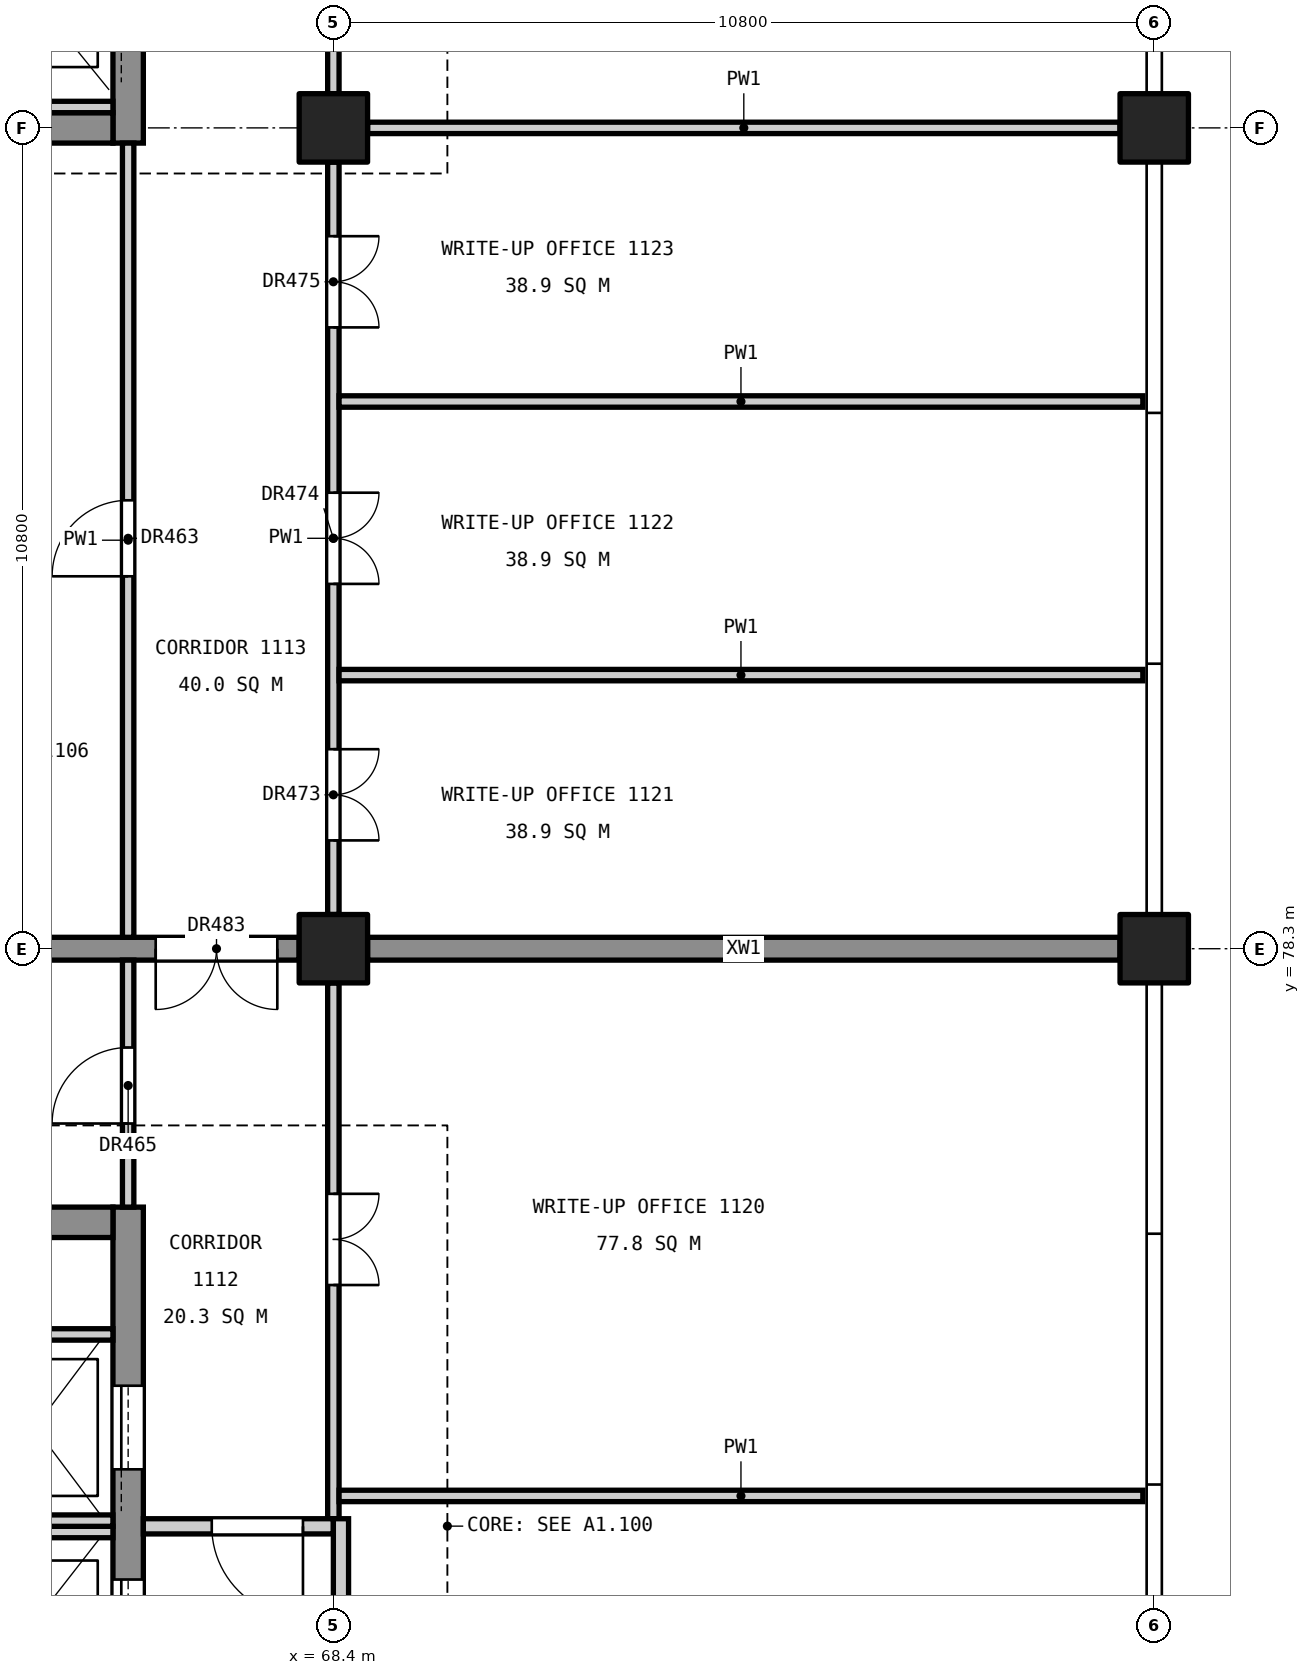
"""IFC4 building model, lengths in metres.
Left out: names, types, materials, properties, quantities, classifications, styles, units other than length and angle.
Written with IfcOpenShell. Run it as: python <this file> out.ifc"""

import sys

from ifc_helpers import new_model, si_unit, direction, frame, frame_2d, origin, origin_2d, place, context, subcontext, project, spatial, rectangle, extrude, element, fill, save


model = new_model("IFC4")
c1 = context("Model", 3, precision=1e-05, world=origin(), true_north=direction((0.0, 1.0)))
c2 = subcontext(c1, "Body", "Model", "MODEL_VIEW")
j1 = project(units=[si_unit("LENGTHUNIT", "METRE"), si_unit("PLANEANGLEUNIT", "RADIAN")], contexts=[c1])
p1 = place(None, origin())
s1 = spatial("IfcSite", under=j1, at=p1, CompositionType="ELEMENT")
p2 = place(p1, origin())
s2 = spatial("IfcBuilding", under=s1, at=p2, CompositionType="ELEMENT")
p3 = place(p2, frame((0.0, 0.0, 55.8)))
s3 = spatial("IfcBuildingStorey", under=s2, at=p3, CompositionType="ELEMENT", Elevation=55.8)
for number, where, z_axis, x_axis in (
    (1, (68.4, 78.3, 0.0), (0.0, 0.0, 1.0), (1.0, 0.0, 0.0)),
    (2, (68.4, 89.1, 0.0), (0.0, 0.0, 1.0), (1.0, 0.0, 0.0)),
    (3, (79.2, 78.3, 0.0), (0.0, 0.0, 1.0), (1.0, 0.0, 0.0)),
    (4, (79.2, 89.1, 0.0), (0.0, 0.0, 1.0), (1.0, 0.0, 0.0)),
):
    element("IfcColumn", number, at=place(p3, frame(where, z_axis=z_axis, x_axis=x_axis)), inside=s3, PredefinedType="COLUMN", context=c2, shape_type="SweptSolid", body=[
        extrude(rectangle(XDim=0.9, YDim=0.9, at=origin_2d()), origin(), (0.0, 0.0, 1.0), 4.8),
    ])
p4 = place(p3, frame((65.7, 60.1, 0.0), z_axis=(0.0, 0.0, 1.0), x_axis=(0.0, 1.0, 0.0)))
e5 = element("IfcWall", 5, at=p4, inside=s3, PredefinedType="SHEAR", context=c2, shape_type="SweptSolid", body=[
    extrude(rectangle(XDim=14.8, YDim=0.4, at=frame_2d((7.4, 0.0))), origin(), (0.0, 0.0, 1.0), 4.55),
])
p5 = place(p4, frame((0.5, 0.0, 0.0)))
e6 = element("IfcOpeningElement", 6, at=p5, cuts=e5, PredefinedType="OPENING", context=c2, shape_type="SweptSolid", body=[
    extrude(rectangle(XDim=1.4, YDim=2.1, at=frame_2d((0.7, 1.05))), frame((0.0, 0.21, 0.0), z_axis=(0.0, -1.0, 0.0), x_axis=(1.0, 0.0, 0.0)), (0.0, 0.0, 1.0), 0.42),
])
p6 = place(p4, frame((8.8, 0.0, 0.0)))
e7 = element("IfcOpeningElement", 7, at=p6, cuts=e5, PredefinedType="OPENING", context=c2, shape_type="SweptSolid", body=[
    extrude(rectangle(XDim=1.1, YDim=2.1, at=frame_2d((0.55, 1.05))), frame((0.0, 0.21, 0.0), z_axis=(0.0, -1.0, 0.0), x_axis=(1.0, 0.0, 0.0)), (0.0, 0.0, 1.0), 0.42),
])
p7 = place(p4, frame((11.35, 0.0, 0.0)))
e8 = element("IfcOpeningElement", 8, at=p7, cuts=e5, PredefinedType="OPENING", context=c2, shape_type="SweptSolid", body=[
    extrude(rectangle(XDim=1.1, YDim=2.1, at=frame_2d((0.55, 1.05))), frame((0.0, 0.21, 0.0), z_axis=(0.0, -1.0, 0.0), x_axis=(1.0, 0.0, 0.0)), (0.0, 0.0, 1.0), 0.42),
])
p8 = place(p3, frame((61.4, 74.7, 0.0), z_axis=(0.0, 0.0, 1.0), x_axis=(1.0, 0.0, 0.0)))
e9 = element("IfcWall", 9, at=p8, inside=s3, PredefinedType="SHEAR", context=c2, shape_type="SweptSolid", body=[
    extrude(rectangle(XDim=4.1, YDim=0.4, at=frame_2d((2.05, 0.0))), origin(), (0.0, 0.0, 1.0), 4.55),
])
p9 = place(p3, frame((65.7, 88.9, 0.0), z_axis=(0.0, 0.0, 1.0), x_axis=(0.0, 1.0, 0.0)))
e10 = element("IfcWall", 10, at=p9, inside=s3, PredefinedType="SHEAR", context=c2, shape_type="SweptSolid", body=[
    extrude(rectangle(XDim=11.2, YDim=0.4, at=frame_2d((5.6, 0.0))), origin(), (0.0, 0.0, 1.0), 4.55),
])
p10 = place(p9, frame((9.3, 0.0, 0.0)))
e11 = element("IfcOpeningElement", 11, at=p10, cuts=e10, PredefinedType="OPENING", context=c2, shape_type="SweptSolid", body=[
    extrude(rectangle(XDim=1.4, YDim=2.1, at=frame_2d((0.7, 1.05))), frame((0.0, 0.21, 0.0), z_axis=(0.0, -1.0, 0.0), x_axis=(1.0, 0.0, 0.0)), (0.0, 0.0, 1.0), 0.42),
])
p11 = place(p9, frame((1.35, 0.0, 0.0)))
e12 = element("IfcOpeningElement", 12, at=p11, cuts=e10, PredefinedType="OPENING", context=c2, shape_type="SweptSolid", body=[
    extrude(rectangle(XDim=1.1, YDim=2.1, at=frame_2d((0.55, 1.05))), frame((0.0, 0.21, 0.0), z_axis=(0.0, -1.0, 0.0), x_axis=(1.0, 0.0, 0.0)), (0.0, 0.0, 1.0), 0.42),
])
p12 = place(p3, frame((61.4, 89.1, 0.0), z_axis=(0.0, 0.0, 1.0), x_axis=(1.0, 0.0, 0.0)))
e13 = element("IfcWall", 13, at=p12, inside=s3, PredefinedType="SHEAR", context=c2, shape_type="SweptSolid", body=[
    extrude(rectangle(XDim=4.1, YDim=0.4, at=frame_2d((2.05, 0.0))), origin(), (0.0, 0.0, 1.0), 4.55),
])
p13 = place(p3, frame((61.65, 78.3, 0.0), z_axis=(0.0, 0.0, 1.0), x_axis=(1.0, 0.0, 0.0)))
e14 = element("IfcWall", 14, at=p13, inside=s3, PredefinedType="SHEAR", context=c2, shape_type="SweptSolid", body=[
    extrude(rectangle(XDim=6.3, YDim=0.3, at=frame_2d((3.15, 0.0))), origin(), (0.0, 0.0, 1.0), 4.55),
])
p14 = place(p13, frame((4.413, 0.0, 0.0)))
e15 = element("IfcOpeningElement", 15, at=p14, cuts=e14, PredefinedType="OPENING", context=c2, shape_type="SweptSolid", body=[
    extrude(rectangle(XDim=1.6, YDim=2.1, at=frame_2d((0.8, 1.05))), frame((0.0, 0.16, 0.0), z_axis=(0.0, -1.0, 0.0), x_axis=(1.0, 0.0, 0.0)), (0.0, 0.0, 1.0), 0.32),
])
p15 = place(p3, frame((68.85, 78.3, 0.0), z_axis=(0.0, 0.0, 1.0), x_axis=(1.0, 0.0, 0.0)))
e16 = element("IfcWall", 16, at=p15, inside=s3, PredefinedType="SHEAR", context=c2, shape_type="SweptSolid", body=[
    extrude(rectangle(XDim=9.9, YDim=0.3, at=frame_2d((4.95, 0.0))), origin(), (0.0, 0.0, 1.0), 4.55),
])
for number, where, z_axis, x_axis in (
    (17, (63.65, 70.625, 0.0), (0.0, 0.0, 1.0), (1.0, 0.0, 0.0)),
    (18, (63.65, 70.775, 0.0), (0.0, 0.0, 1.0), (1.0, 0.0, 0.0)),
    (19, (63.65, 73.225, 0.0), (0.0, 0.0, 1.0), (1.0, 0.0, 0.0)),
    (20, (63.65, 89.375, 0.0), (0.0, 0.0, 1.0), (1.0, 0.0, 0.0)),
):
    element("IfcWall", number, at=place(p3, frame(where, z_axis=z_axis, x_axis=x_axis)), inside=s3, PredefinedType="SOLIDWALL", context=c2, shape_type="SweptSolid", body=[
        extrude(rectangle(XDim=1.85, YDim=0.15, at=frame_2d((0.925, 0.0))), origin(), (0.0, 0.0, 1.0), 4.8),
    ])
p16 = place(p3, frame((65.7, 74.9, 0.0), z_axis=(0.0, 0.0, 1.0), x_axis=(0.0, 1.0, 0.0)))
e21 = element("IfcWall", 21, at=p16, inside=s3, PredefinedType="PARTITIONING", context=c2, shape_type="SweptSolid", body=[
    extrude(rectangle(XDim=3.25, YDim=0.15, at=frame_2d((1.625, 0.0))), origin(), (0.0, 0.0, 1.0), 3.55),
])
p17 = place(p16, frame((1.1, 0.0, 0.0)))
e22 = element("IfcOpeningElement", 22, at=p17, cuts=e21, PredefinedType="OPENING", context=c2, shape_type="SweptSolid", body=[
    extrude(rectangle(XDim=1.0, YDim=2.1, at=frame_2d((0.5, 1.05))), frame((0.0, 0.085, 0.0), z_axis=(0.0, -1.0, 0.0), x_axis=(1.0, 0.0, 0.0)), (0.0, 0.0, 1.0), 0.17),
])
p18 = place(p3, frame((65.7, 78.45, 0.0), z_axis=(0.0, 0.0, 1.0), x_axis=(0.0, 1.0, 0.0)))
e23 = element("IfcWall", 23, at=p18, inside=s3, PredefinedType="PARTITIONING", context=c2, shape_type="SweptSolid", body=[
    extrude(rectangle(XDim=10.45, YDim=0.15, at=frame_2d((5.225, 0.0))), origin(), (0.0, 0.0, 1.0), 3.55),
])
p19 = place(p18, frame((4.75, 0.0, 0.0)))
e24 = element("IfcOpeningElement", 24, at=p19, cuts=e23, PredefinedType="OPENING", context=c2, shape_type="SweptSolid", body=[
    extrude(rectangle(XDim=1.0, YDim=2.1, at=frame_2d((0.5, 1.05))), frame((0.0, 0.085, 0.0), z_axis=(0.0, -1.0, 0.0), x_axis=(1.0, 0.0, 0.0)), (0.0, 0.0, 1.0), 0.17),
])
p20 = place(p3, frame((68.4, 70.8, 0.0), z_axis=(0.0, 0.0, 1.0), x_axis=(0.0, 1.0, 0.0)))
e25 = element("IfcWall", 25, at=p20, inside=s3, PredefinedType="PARTITIONING", context=c2, shape_type="SweptSolid", body=[
    extrude(rectangle(XDim=7.05, YDim=0.15, at=frame_2d((3.525, 0.0))), origin(), (0.0, 0.0, 1.0), 3.55),
])
p21 = place(p20, frame((3.075, 0.0, 0.0)))
e26 = element("IfcOpeningElement", 26, at=p21, cuts=e25, PredefinedType="OPENING", context=c2, shape_type="SweptSolid", body=[
    extrude(rectangle(XDim=1.2, YDim=2.1, at=frame_2d((0.6, 1.05))), frame((0.0, 0.085, 0.0), z_axis=(0.0, -1.0, 0.0), x_axis=(1.0, 0.0, 0.0)), (0.0, 0.0, 1.0), 0.17),
])
p22 = place(p3, frame((68.4, 78.75, 0.0), z_axis=(0.0, 0.0, 1.0), x_axis=(0.0, 1.0, 0.0)))
e27 = element("IfcWall", 27, at=p22, inside=s3, PredefinedType="PARTITIONING", context=c2, shape_type="SweptSolid", body=[
    extrude(rectangle(XDim=9.9, YDim=0.15, at=frame_2d((4.95, 0.0))), origin(), (0.0, 0.0, 1.0), 3.55),
])
p23 = place(p22, frame((0.975, 0.0, 0.0)))
e28 = element("IfcOpeningElement", 28, at=p23, cuts=e27, PredefinedType="OPENING", context=c2, shape_type="SweptSolid", body=[
    extrude(rectangle(XDim=1.2, YDim=2.1, at=frame_2d((0.6, 1.05))), frame((0.0, 0.085, 0.0), z_axis=(0.0, -1.0, 0.0), x_axis=(1.0, 0.0, 0.0)), (0.0, 0.0, 1.0), 0.17),
])
p24 = place(p22, frame((4.35, 0.0, 0.0)))
e29 = element("IfcOpeningElement", 29, at=p24, cuts=e27, PredefinedType="OPENING", context=c2, shape_type="SweptSolid", body=[
    extrude(rectangle(XDim=1.2, YDim=2.1, at=frame_2d((0.6, 1.05))), frame((0.0, 0.085, 0.0), z_axis=(0.0, -1.0, 0.0), x_axis=(1.0, 0.0, 0.0)), (0.0, 0.0, 1.0), 0.17),
])
p25 = place(p22, frame((7.725, 0.0, 0.0)))
e30 = element("IfcOpeningElement", 30, at=p25, cuts=e27, PredefinedType="OPENING", context=c2, shape_type="SweptSolid", body=[
    extrude(rectangle(XDim=1.2, YDim=2.1, at=frame_2d((0.6, 1.05))), frame((0.0, 0.085, 0.0), z_axis=(0.0, -1.0, 0.0), x_axis=(1.0, 0.0, 0.0)), (0.0, 0.0, 1.0), 0.17),
])
p26 = place(p3, frame((68.4, 89.55, 0.0), z_axis=(0.0, 0.0, 1.0), x_axis=(0.0, 1.0, 0.0)))
e31 = element("IfcWall", 31, at=p26, inside=s3, PredefinedType="PARTITIONING", context=c2, shape_type="SweptSolid", body=[
    extrude(rectangle(XDim=3.55, YDim=0.15, at=frame_2d((1.775, 0.0))), origin(), (0.0, 0.0, 1.0), 3.55),
])
p27 = place(p26, frame((1.175, 0.0, 0.0)))
e32 = element("IfcOpeningElement", 32, at=p27, cuts=e31, PredefinedType="OPENING", context=c2, shape_type="SweptSolid", body=[
    extrude(rectangle(XDim=1.2, YDim=2.1, at=frame_2d((0.6, 1.05))), frame((0.0, 0.085, 0.0), z_axis=(0.0, -1.0, 0.0), x_axis=(1.0, 0.0, 0.0)), (0.0, 0.0, 1.0), 0.17),
])
p28 = place(p3, frame((65.9, 70.7, 0.0), z_axis=(0.0, 0.0, 1.0), x_axis=(1.0, 0.0, 0.0)))
e33 = element("IfcWall", 33, at=p28, inside=s3, PredefinedType="PARTITIONING", context=c2, shape_type="SweptSolid", body=[
    extrude(rectangle(XDim=2.5, YDim=0.2, at=frame_2d((1.25, 0.0))), origin(), (0.0, 0.0, 1.0), 3.55),
])
p29 = place(p28, frame((0.9, 0.0, 0.0)))
e34 = element("IfcOpeningElement", 34, at=p29, cuts=e33, PredefinedType="OPENING", context=c2, shape_type="SweptSolid", body=[
    extrude(rectangle(XDim=1.2, YDim=2.1, at=frame_2d((0.6, 1.05))), frame((0.0, 0.11, 0.0), z_axis=(0.0, -1.0, 0.0), x_axis=(1.0, 0.0, 0.0)), (0.0, 0.0, 1.0), 0.22),
])
p30 = place(p3, frame((68.5, 67.95, 0.0), z_axis=(0.0, 0.0, 1.0), x_axis=(0.0, 1.0, 0.0)))
e35 = element("IfcWall", 35, at=p30, inside=s3, PredefinedType="PARTITIONING", context=c2, shape_type="SweptSolid", body=[
    extrude(rectangle(XDim=2.85, YDim=0.2, at=frame_2d((1.425, 0.0))), origin(), (0.0, 0.0, 1.0), 3.55),
])
for number, where, z_axis, x_axis in (
    (36, (68.475, 71.1, 0.0), (0.0, 0.0, 1.0), (1.0, 0.0, 0.0)),
    (37, (68.475, 81.9, 0.0), (0.0, 0.0, 1.0), (1.0, 0.0, 0.0)),
    (38, (68.475, 85.5, 0.0), (0.0, 0.0, 1.0), (1.0, 0.0, 0.0)),
):
    element("IfcWall", number, at=place(p3, frame(where, z_axis=z_axis, x_axis=x_axis)), inside=s3, PredefinedType="PARTITIONING", context=c2, shape_type="SweptSolid", body=[
        extrude(rectangle(XDim=10.575, YDim=0.15, at=frame_2d((5.288, 0.0))), origin(), (0.0, 0.0, 1.0), 3.85),
    ])
p31 = place(p3, frame((68.85, 89.1, 0.0), z_axis=(0.0, 0.0, 1.0), x_axis=(1.0, 0.0, 0.0)))
e39 = element("IfcWall", 39, at=p31, inside=s3, PredefinedType="PARTITIONING", context=c2, shape_type="SweptSolid", body=[
    extrude(rectangle(XDim=9.9, YDim=0.15, at=frame_2d((4.95, 0.0))), origin(), (0.0, 0.0, 1.0), 3.85),
])
p32 = place(p6, origin())
e40 = element("IfcDoor", 40, at=p32, inside=s3, OperationType="SLIDING_TO_LEFT", PredefinedType="DOOR", context=c2, shape_type="SweptSolid", body=[
    extrude(rectangle(XDim=1.1, YDim=2.1, at=frame_2d((0.55, 1.05))), frame((0.0, 0.025, 0.0), z_axis=(0.0, -1.0, 0.0), x_axis=(1.0, 0.0, 0.0)), (0.0, 0.0, 1.0), 0.05),
])
fill(e7, e40)
p33 = place(p7, origin())
e41 = element("IfcDoor", 41, at=p33, inside=s3, OperationType="SLIDING_TO_LEFT", PredefinedType="DOOR", context=c2, shape_type="SweptSolid", body=[
    extrude(rectangle(XDim=1.1, YDim=2.1, at=frame_2d((0.55, 1.05))), frame((0.0, 0.025, 0.0), z_axis=(0.0, -1.0, 0.0), x_axis=(1.0, 0.0, 0.0)), (0.0, 0.0, 1.0), 0.05),
])
fill(e8, e41)
p34 = place(p19, origin())
e42 = element("IfcDoor", 42, at=p34, inside=s3, OperationType="SINGLE_SWING_LEFT", PredefinedType="DOOR", context=c2, shape_type="SweptSolid", body=[
    extrude(rectangle(XDim=1.0, YDim=2.1, at=frame_2d((0.5, 1.05))), frame((0.0, 0.025, 0.0), z_axis=(0.0, -1.0, 0.0), x_axis=(1.0, 0.0, 0.0)), (0.0, 0.0, 1.0), 0.05),
])
fill(e24, e42)
p35 = place(p17, origin())
e43 = element("IfcDoor", 43, at=p35, inside=s3, OperationType="SINGLE_SWING_LEFT", PredefinedType="DOOR", context=c2, shape_type="SweptSolid", body=[
    extrude(rectangle(XDim=1.0, YDim=2.1, at=frame_2d((0.5, 1.05))), frame((0.0, 0.025, 0.0), z_axis=(0.0, -1.0, 0.0), x_axis=(1.0, 0.0, 0.0)), (0.0, 0.0, 1.0), 0.05),
])
fill(e22, e43)
p36 = place(p21, frame((1.2, 0.0, 0.0), z_axis=(0.0, 0.0, 1.0), x_axis=(-1.0, 0.0, 0.0)))
e44 = element("IfcDoor", 44, at=p36, inside=s3, OperationType="DOUBLE_DOOR_SINGLE_SWING", PredefinedType="DOOR", context=c2, shape_type="SweptSolid", body=[
    extrude(rectangle(XDim=1.2, YDim=2.1, at=frame_2d((0.6, 1.05))), frame((0.0, 0.025, 0.0), z_axis=(0.0, -1.0, 0.0), x_axis=(1.0, 0.0, 0.0)), (0.0, 0.0, 1.0), 0.05),
])
fill(e26, e44)
p37 = place(p23, frame((1.2, 0.0, 0.0), z_axis=(0.0, 0.0, 1.0), x_axis=(-1.0, 0.0, 0.0)))
e45 = element("IfcDoor", 45, at=p37, inside=s3, OperationType="DOUBLE_DOOR_SINGLE_SWING", PredefinedType="DOOR", context=c2, shape_type="SweptSolid", body=[
    extrude(rectangle(XDim=1.2, YDim=2.1, at=frame_2d((0.6, 1.05))), frame((0.0, 0.025, 0.0), z_axis=(0.0, -1.0, 0.0), x_axis=(1.0, 0.0, 0.0)), (0.0, 0.0, 1.0), 0.05),
])
fill(e28, e45)
p38 = place(p24, frame((1.2, 0.0, 0.0), z_axis=(0.0, 0.0, 1.0), x_axis=(-1.0, 0.0, 0.0)))
e46 = element("IfcDoor", 46, at=p38, inside=s3, OperationType="DOUBLE_DOOR_SINGLE_SWING", PredefinedType="DOOR", context=c2, shape_type="SweptSolid", body=[
    extrude(rectangle(XDim=1.2, YDim=2.1, at=frame_2d((0.6, 1.05))), frame((0.0, 0.025, 0.0), z_axis=(0.0, -1.0, 0.0), x_axis=(1.0, 0.0, 0.0)), (0.0, 0.0, 1.0), 0.05),
])
fill(e29, e46)
p39 = place(p25, frame((1.2, 0.0, 0.0), z_axis=(0.0, 0.0, 1.0), x_axis=(-1.0, 0.0, 0.0)))
e47 = element("IfcDoor", 47, at=p39, inside=s3, OperationType="DOUBLE_DOOR_SINGLE_SWING", PredefinedType="DOOR", context=c2, shape_type="SweptSolid", body=[
    extrude(rectangle(XDim=1.2, YDim=2.1, at=frame_2d((0.6, 1.05))), frame((0.0, 0.025, 0.0), z_axis=(0.0, -1.0, 0.0), x_axis=(1.0, 0.0, 0.0)), (0.0, 0.0, 1.0), 0.05),
])
fill(e30, e47)
p40 = place(p29, frame((1.2, 0.0, 0.0), z_axis=(0.0, 0.0, 1.0), x_axis=(-1.0, 0.0, 0.0)))
e48 = element("IfcDoor", 48, at=p40, inside=s3, OperationType="SINGLE_SWING_LEFT", PredefinedType="DOOR", context=c2, shape_type="SweptSolid", body=[
    extrude(rectangle(XDim=1.2, YDim=2.1, at=frame_2d((0.6, 1.05))), frame((0.0, 0.025, 0.0), z_axis=(0.0, -1.0, 0.0), x_axis=(1.0, 0.0, 0.0)), (0.0, 0.0, 1.0), 0.05),
])
fill(e34, e48)
p41 = place(p14, frame((1.6, 0.0, 0.0), z_axis=(0.0, 0.0, 1.0), x_axis=(-1.0, 0.0, 0.0)))
e49 = element("IfcDoor", 49, at=p41, inside=s3, OperationType="DOUBLE_DOOR_SINGLE_SWING", PredefinedType="DOOR", context=c2, shape_type="SweptSolid", body=[
    extrude(rectangle(XDim=1.6, YDim=2.1, at=frame_2d((0.8, 1.05))), frame((0.0, 0.025, 0.0), z_axis=(0.0, -1.0, 0.0), x_axis=(1.0, 0.0, 0.0)), (0.0, 0.0, 1.0), 0.05),
])
fill(e15, e49)
save(model, sys.argv[1])
